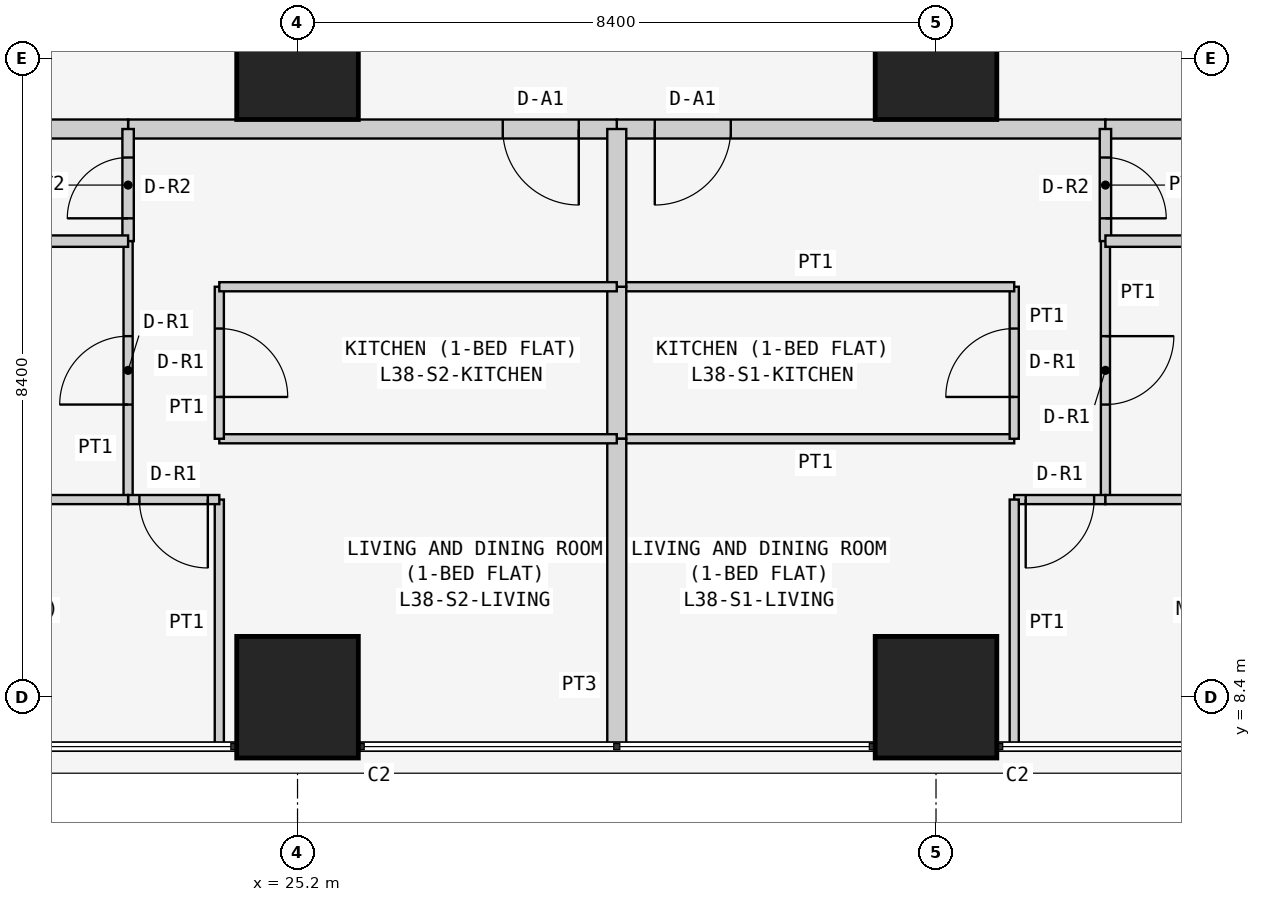
"""IFC4 building model, lengths in metres.
Left out: names, types, materials, properties, quantities, classifications, styles, units other than length and angle.
Written with IfcOpenShell. Run it as: python <this file> out.ifc"""

import sys

from ifc_helpers import new_model, si_unit, direction, frame, frame_2d, origin, origin_2d, place, context, subcontext, project, spatial, rectangle, extrude, element, fill, save


model = new_model("IFC4")
c1 = context("Model", 3, precision=1e-05, world=origin(), true_north=direction((0.0, 1.0)))
c2 = subcontext(c1, "Body", "Model", "MODEL_VIEW")
j1 = project(units=[si_unit("LENGTHUNIT", "METRE"), si_unit("PLANEANGLEUNIT", "RADIAN")], contexts=[c1])
p1 = place(None, origin())
s1 = spatial("IfcSite", under=j1, at=p1, CompositionType="ELEMENT")
p2 = place(p1, origin())
s2 = spatial("IfcBuilding", under=s1, at=p2, CompositionType="ELEMENT")
p3 = place(p2, frame((0.0, 0.0, 148.5)))
s3 = spatial("IfcBuildingStorey", under=s2, at=p3, CompositionType="ELEMENT", Elevation=148.5)
for number, where, z_axis, x_axis in (
    (1, (25.2, 8.4, 0.0), (0.0, 0.0, 1.0), (1.0, 0.0, 0.0)),
    (2, (25.2, 16.8, 0.0), (0.0, 0.0, 1.0), (1.0, 0.0, 0.0)),
    (3, (33.6, 8.4, 0.0), (0.0, 0.0, 1.0), (1.0, 0.0, 0.0)),
    (4, (33.6, 16.8, 0.0), (0.0, 0.0, 1.0), (1.0, 0.0, 0.0)),
):
    element("IfcColumn", number, at=place(p3, frame(where, z_axis=z_axis, x_axis=x_axis)), inside=s3, PredefinedType="COLUMN", context=c2, shape_type="SweptSolid", body=[
        extrude(rectangle(XDim=1.6, YDim=1.6, at=origin_2d()), origin(), (0.0, 0.0, 1.0), 3.6),
    ])
p4 = place(p3, frame((35.829, 15.875, 0.0), z_axis=(0.0, 0.0, 1.0), x_axis=(-1.0, 0.0, 0.0)))
e5 = element("IfcWall", 5, at=p4, inside=s3, PredefinedType="PARTITIONING", context=c2, shape_type="SweptSolid", body=[
    extrude(rectangle(XDim=6.429, YDim=0.25, at=frame_2d((3.215, 0.0))), origin(), (0.0, 0.0, 1.0), 3.45),
])
p5 = place(p4, frame((4.929, 0.0, 0.0)))
e6 = element("IfcOpeningElement", 6, at=p5, cuts=e5, PredefinedType="OPENING", context=c2, shape_type="SweptSolid", body=[
    extrude(rectangle(XDim=1.0, YDim=2.1, at=frame_2d((0.5, 1.05))), frame((0.0, 0.135, 0.0), z_axis=(0.0, -1.0, 0.0), x_axis=(1.0, 0.0, 0.0)), (0.0, 0.0, 1.0), 0.27),
])
p6 = place(p3, frame((42.7, 15.875, 0.0), z_axis=(0.0, 0.0, 1.0), x_axis=(-1.0, 0.0, 0.0)))
e7 = element("IfcWall", 7, at=p6, inside=s3, PredefinedType="PARTITIONING", context=c2, shape_type="SweptSolid", body=[
    extrude(rectangle(XDim=6.871, YDim=0.25, at=frame_2d((3.436, 0.0))), origin(), (0.0, 0.0, 1.0), 3.45),
])
p7 = place(p3, frame((29.4, 15.875, 0.0), z_axis=(0.0, 0.0, 1.0), x_axis=(-1.0, 0.0, 0.0)))
e8 = element("IfcWall", 8, at=p7, inside=s3, PredefinedType="PARTITIONING", context=c2, shape_type="SweptSolid", body=[
    extrude(rectangle(XDim=6.429, YDim=0.25, at=frame_2d((3.214, 0.0))), origin(), (0.0, 0.0, 1.0), 3.45),
])
p8 = place(p7, frame((0.5, 0.0, 0.0)))
e9 = element("IfcOpeningElement", 9, at=p8, cuts=e8, PredefinedType="OPENING", context=c2, shape_type="SweptSolid", body=[
    extrude(rectangle(XDim=1.0, YDim=2.1, at=frame_2d((0.5, 1.05))), frame((0.0, 0.135, 0.0), z_axis=(0.0, -1.0, 0.0), x_axis=(1.0, 0.0, 0.0)), (0.0, 0.0, 1.0), 0.27),
])
p9 = place(p3, frame((22.971, 15.875, 0.0), z_axis=(0.0, 0.0, 1.0), x_axis=(-1.0, 0.0, 0.0)))
e10 = element("IfcWall", 10, at=p9, inside=s3, PredefinedType="PARTITIONING", context=c2, shape_type="SweptSolid", body=[
    extrude(rectangle(XDim=6.871, YDim=0.25, at=frame_2d((3.436, 0.0))), origin(), (0.0, 0.0, 1.0), 3.45),
])
p10 = place(p3, frame((29.4, 11.8, 0.0), z_axis=(0.0, 0.0, 1.0), x_axis=(1.0, 0.0, 0.0)))
e11 = element("IfcWall", 11, at=p10, inside=s3, PredefinedType="PARTITIONING", context=c2, shape_type="SweptSolid", body=[
    extrude(rectangle(XDim=5.229, YDim=0.12, at=frame_2d((2.615, 0.0))), origin(), (0.0, 0.0, 1.0), 3.45),
])
p11 = place(p3, frame((34.629, 11.8, 0.0), z_axis=(0.0, 0.0, 1.0), x_axis=(0.0, 1.0, 0.0)))
e12 = element("IfcWall", 12, at=p11, inside=s3, PredefinedType="PARTITIONING", context=c2, shape_type="SweptSolid", body=[
    extrude(rectangle(XDim=2.0, YDim=0.12, at=frame_2d((1.0, 0.0))), origin(), (0.0, 0.0, 1.0), 3.45),
])
p12 = place(p11, frame((0.55, 0.0, 0.0)))
e13 = element("IfcOpeningElement", 13, at=p12, cuts=e12, PredefinedType="OPENING", context=c2, shape_type="SweptSolid", body=[
    extrude(rectangle(XDim=0.9, YDim=2.1, at=frame_2d((0.45, 1.05))), frame((0.0, 0.07, 0.0), z_axis=(0.0, -1.0, 0.0), x_axis=(1.0, 0.0, 0.0)), (0.0, 0.0, 1.0), 0.14),
])
p13 = place(p3, frame((34.629, 13.8, 0.0), z_axis=(0.0, 0.0, 1.0), x_axis=(-1.0, 0.0, 0.0)))
e14 = element("IfcWall", 14, at=p13, inside=s3, PredefinedType="PARTITIONING", context=c2, shape_type="SweptSolid", body=[
    extrude(rectangle(XDim=5.229, YDim=0.12, at=frame_2d((2.615, 0.0))), origin(), (0.0, 0.0, 1.0), 3.45),
])
p14 = place(p3, frame((29.4, 13.8, 0.0), z_axis=(0.0, 0.0, 1.0), x_axis=(0.0, -1.0, 0.0)))
e15 = element("IfcWall", 15, at=p14, inside=s3, PredefinedType="PARTITIONING", context=c2, shape_type="SweptSolid", body=[
    extrude(rectangle(XDim=2.0, YDim=0.25, at=frame_2d((1.0, 0.0))), origin(), (0.0, 0.0, 1.0), 2.848),
])
p15 = place(p3, frame((35.829, 15.875, 0.0), z_axis=(0.0, 0.0, 1.0), x_axis=(0.0, -1.0, 0.0)))
e16 = element("IfcWall", 16, at=p15, inside=s3, PredefinedType="PARTITIONING", context=c2, shape_type="SweptSolid", body=[
    extrude(rectangle(XDim=1.475, YDim=0.15, at=frame_2d((0.738, 0.0))), origin(), (0.0, 0.0, 1.0), 3.45),
])
p16 = place(p15, frame((0.375, 0.0, 0.0)))
e17 = element("IfcOpeningElement", 17, at=p16, cuts=e16, PredefinedType="OPENING", context=c2, shape_type="SweptSolid", body=[
    extrude(rectangle(XDim=0.8, YDim=2.1, at=frame_2d((0.4, 1.05))), frame((0.0, 0.085, 0.0), z_axis=(0.0, -1.0, 0.0), x_axis=(1.0, 0.0, 0.0)), (0.0, 0.0, 1.0), 0.17),
])
p17 = place(p3, frame((35.829, 14.4, 0.0), z_axis=(0.0, 0.0, 1.0), x_axis=(0.0, -1.0, 0.0)))
e18 = element("IfcWall", 18, at=p17, inside=s3, PredefinedType="PARTITIONING", context=c2, shape_type="SweptSolid", body=[
    extrude(rectangle(XDim=3.4, YDim=0.12, at=frame_2d((1.7, 0.0))), origin(), (0.0, 0.0, 1.0), 3.45),
])
p18 = place(p17, frame((1.25, 0.0, 0.0)))
e19 = element("IfcOpeningElement", 19, at=p18, cuts=e18, PredefinedType="OPENING", context=c2, shape_type="SweptSolid", body=[
    extrude(rectangle(XDim=0.9, YDim=2.1, at=frame_2d((0.45, 1.05))), frame((0.0, 0.07, 0.0), z_axis=(0.0, -1.0, 0.0), x_axis=(1.0, 0.0, 0.0)), (0.0, 0.0, 1.0), 0.14),
])
p19 = place(p3, frame((35.829, 11.0, 0.0), z_axis=(0.0, 0.0, 1.0), x_axis=(-1.0, 0.0, 0.0)))
e20 = element("IfcWall", 20, at=p19, inside=s3, PredefinedType="PARTITIONING", context=c2, shape_type="SweptSolid", body=[
    extrude(rectangle(XDim=1.2, YDim=0.12, at=frame_2d((0.6, 0.0))), origin(), (0.0, 0.0, 1.0), 3.45),
])
p20 = place(p19, frame((0.149, 0.0, 0.0)))
e21 = element("IfcOpeningElement", 21, at=p20, cuts=e20, PredefinedType="OPENING", context=c2, shape_type="SweptSolid", body=[
    extrude(rectangle(XDim=0.9, YDim=2.1, at=frame_2d((0.45, 1.05))), frame((0.0, 0.07, 0.0), z_axis=(0.0, -1.0, 0.0), x_axis=(1.0, 0.0, 0.0)), (0.0, 0.0, 1.0), 0.14),
])
p21 = place(p3, frame((34.629, 11.0, 0.0), z_axis=(0.0, 0.0, 1.0), x_axis=(0.0, -1.0, 0.0)))
e22 = element("IfcWall", 22, at=p21, inside=s3, PredefinedType="PARTITIONING", context=c2, shape_type="SweptSolid", body=[
    extrude(rectangle(XDim=3.25, YDim=0.12, at=frame_2d((1.625, 0.0))), origin(), (0.0, 0.0, 1.0), 3.45),
])
p22 = place(p3, frame((29.4, 7.75, 0.0), z_axis=(0.0, 0.0, 1.0), x_axis=(0.0, 1.0, 0.0)))
e23 = element("IfcWall", 23, at=p22, inside=s3, PredefinedType="PARTITIONING", context=c2, shape_type="SweptSolid", body=[
    extrude(rectangle(XDim=4.05, YDim=0.25, at=frame_2d((2.025, 0.0))), origin(), (0.0, 0.0, 1.0), 2.848),
])
p23 = place(p3, frame((29.4, 13.8, 0.0), z_axis=(0.0, 0.0, 1.0), x_axis=(0.0, 1.0, 0.0)))
e24 = element("IfcWall", 24, at=p23, inside=s3, PredefinedType="PARTITIONING", context=c2, shape_type="SweptSolid", body=[
    extrude(rectangle(XDim=2.075, YDim=0.25, at=frame_2d((1.038, 0.0))), origin(), (0.0, 0.0, 1.0), 2.848),
])
p24 = place(p3, frame((35.829, 14.4, 0.0), z_axis=(0.0, 0.0, 1.0), x_axis=(1.0, 0.0, 0.0)))
e25 = element("IfcWall", 25, at=p24, inside=s3, PredefinedType="PARTITIONING", context=c2, shape_type="SweptSolid", body=[
    extrude(rectangle(XDim=6.871, YDim=0.15, at=frame_2d((3.436, 0.0))), origin(), (0.0, 0.0, 1.0), 3.45),
])
p25 = place(p3, frame((35.829, 11.0, 0.0), z_axis=(0.0, 0.0, 1.0), x_axis=(1.0, 0.0, 0.0)))
e26 = element("IfcWall", 26, at=p25, inside=s3, PredefinedType="PARTITIONING", context=c2, shape_type="SweptSolid", body=[
    extrude(rectangle(XDim=6.871, YDim=0.12, at=frame_2d((3.436, 0.0))), origin(), (0.0, 0.0, 1.0), 3.45),
])
p26 = place(p3, frame((29.4, 11.8, 0.0), z_axis=(0.0, 0.0, 1.0), x_axis=(-1.0, 0.0, 0.0)))
e27 = element("IfcWall", 27, at=p26, inside=s3, PredefinedType="PARTITIONING", context=c2, shape_type="SweptSolid", body=[
    extrude(rectangle(XDim=5.229, YDim=0.12, at=frame_2d((2.615, 0.0))), origin(), (0.0, 0.0, 1.0), 3.45),
])
p27 = place(p3, frame((24.171, 11.8, 0.0), z_axis=(0.0, 0.0, 1.0), x_axis=(0.0, 1.0, 0.0)))
e28 = element("IfcWall", 28, at=p27, inside=s3, PredefinedType="PARTITIONING", context=c2, shape_type="SweptSolid", body=[
    extrude(rectangle(XDim=2.0, YDim=0.12, at=frame_2d((1.0, 0.0))), origin(), (0.0, 0.0, 1.0), 3.45),
])
p28 = place(p27, frame((0.55, 0.0, 0.0)))
e29 = element("IfcOpeningElement", 29, at=p28, cuts=e28, PredefinedType="OPENING", context=c2, shape_type="SweptSolid", body=[
    extrude(rectangle(XDim=0.9, YDim=2.1, at=frame_2d((0.45, 1.05))), frame((0.0, 0.07, 0.0), z_axis=(0.0, -1.0, 0.0), x_axis=(1.0, 0.0, 0.0)), (0.0, 0.0, 1.0), 0.14),
])
p29 = place(p3, frame((24.171, 13.8, 0.0), z_axis=(0.0, 0.0, 1.0), x_axis=(1.0, 0.0, 0.0)))
e30 = element("IfcWall", 30, at=p29, inside=s3, PredefinedType="PARTITIONING", context=c2, shape_type="SweptSolid", body=[
    extrude(rectangle(XDim=5.229, YDim=0.12, at=frame_2d((2.615, 0.0))), origin(), (0.0, 0.0, 1.0), 3.45),
])
p30 = place(p3, frame((22.971, 14.4, 0.0), z_axis=(0.0, 0.0, 1.0), x_axis=(0.0, 1.0, 0.0)))
e31 = element("IfcWall", 31, at=p30, inside=s3, PredefinedType="PARTITIONING", context=c2, shape_type="SweptSolid", body=[
    extrude(rectangle(XDim=1.475, YDim=0.15, at=frame_2d((0.738, 0.0))), origin(), (0.0, 0.0, 1.0), 3.45),
])
p31 = place(p30, frame((0.3, 0.0, 0.0)))
e32 = element("IfcOpeningElement", 32, at=p31, cuts=e31, PredefinedType="OPENING", context=c2, shape_type="SweptSolid", body=[
    extrude(rectangle(XDim=0.8, YDim=2.1, at=frame_2d((0.4, 1.05))), frame((0.0, 0.085, 0.0), z_axis=(0.0, -1.0, 0.0), x_axis=(1.0, 0.0, 0.0)), (0.0, 0.0, 1.0), 0.17),
])
p32 = place(p3, frame((22.971, 11.0, 0.0), z_axis=(0.0, 0.0, 1.0), x_axis=(0.0, 1.0, 0.0)))
e33 = element("IfcWall", 33, at=p32, inside=s3, PredefinedType="PARTITIONING", context=c2, shape_type="SweptSolid", body=[
    extrude(rectangle(XDim=3.4, YDim=0.12, at=frame_2d((1.7, 0.0))), origin(), (0.0, 0.0, 1.0), 3.45),
])
p33 = place(p32, frame((1.25, 0.0, 0.0)))
e34 = element("IfcOpeningElement", 34, at=p33, cuts=e33, PredefinedType="OPENING", context=c2, shape_type="SweptSolid", body=[
    extrude(rectangle(XDim=0.9, YDim=2.1, at=frame_2d((0.45, 1.05))), frame((0.0, 0.07, 0.0), z_axis=(0.0, -1.0, 0.0), x_axis=(1.0, 0.0, 0.0)), (0.0, 0.0, 1.0), 0.14),
])
p34 = place(p3, frame((24.171, 7.75, 0.0), z_axis=(0.0, 0.0, 1.0), x_axis=(0.0, 1.0, 0.0)))
e35 = element("IfcWall", 35, at=p34, inside=s3, PredefinedType="PARTITIONING", context=c2, shape_type="SweptSolid", body=[
    extrude(rectangle(XDim=3.25, YDim=0.12, at=frame_2d((1.625, 0.0))), origin(), (0.0, 0.0, 1.0), 3.45),
])
p35 = place(p3, frame((24.171, 11.0, 0.0), z_axis=(0.0, 0.0, 1.0), x_axis=(-1.0, 0.0, 0.0)))
e36 = element("IfcWall", 36, at=p35, inside=s3, PredefinedType="PARTITIONING", context=c2, shape_type="SweptSolid", body=[
    extrude(rectangle(XDim=1.2, YDim=0.12, at=frame_2d((0.6, 0.0))), origin(), (0.0, 0.0, 1.0), 3.45),
])
p36 = place(p35, frame((0.151, 0.0, 0.0)))
e37 = element("IfcOpeningElement", 37, at=p36, cuts=e36, PredefinedType="OPENING", context=c2, shape_type="SweptSolid", body=[
    extrude(rectangle(XDim=0.9, YDim=2.1, at=frame_2d((0.45, 1.05))), frame((0.0, 0.07, 0.0), z_axis=(0.0, -1.0, 0.0), x_axis=(1.0, 0.0, 0.0)), (0.0, 0.0, 1.0), 0.14),
])
p37 = place(p3, frame((22.971, 14.4, 0.0), z_axis=(0.0, 0.0, 1.0), x_axis=(-1.0, 0.0, 0.0)))
e38 = element("IfcWall", 38, at=p37, inside=s3, PredefinedType="PARTITIONING", context=c2, shape_type="SweptSolid", body=[
    extrude(rectangle(XDim=6.871, YDim=0.15, at=frame_2d((3.436, 0.0))), origin(), (0.0, 0.0, 1.0), 3.45),
])
p38 = place(p3, frame((22.971, 11.0, 0.0), z_axis=(0.0, 0.0, 1.0), x_axis=(-1.0, 0.0, 0.0)))
e39 = element("IfcWall", 39, at=p38, inside=s3, PredefinedType="PARTITIONING", context=c2, shape_type="SweptSolid", body=[
    extrude(rectangle(XDim=6.871, YDim=0.12, at=frame_2d((3.436, 0.0))), origin(), (0.0, 0.0, 1.0), 3.45),
])
p39 = place(p5, origin())
e40 = element("IfcDoor", 40, at=p39, inside=s3, OperationType="SINGLE_SWING_RIGHT", PredefinedType="DOOR", context=c2, shape_type="SweptSolid", body=[
    extrude(rectangle(XDim=1.0, YDim=2.1, at=frame_2d((0.5, 1.05))), frame((0.0, 0.025, 0.0), z_axis=(0.0, -1.0, 0.0), x_axis=(1.0, 0.0, 0.0)), (0.0, 0.0, 1.0), 0.05),
])
fill(e6, e40)
p40 = place(p12, origin())
e41 = element("IfcDoor", 41, at=p40, inside=s3, OperationType="SINGLE_SWING_LEFT", PredefinedType="DOOR", context=c2, shape_type="SweptSolid", body=[
    extrude(rectangle(XDim=0.9, YDim=2.1, at=frame_2d((0.45, 1.05))), frame((0.0, 0.025, 0.0), z_axis=(0.0, -1.0, 0.0), x_axis=(1.0, 0.0, 0.0)), (0.0, 0.0, 1.0), 0.05),
])
fill(e13, e41)
p41 = place(p16, origin())
e42 = element("IfcDoor", 42, at=p41, inside=s3, OperationType="SINGLE_SWING_RIGHT", PredefinedType="DOOR", context=c2, shape_type="SweptSolid", body=[
    extrude(rectangle(XDim=0.8, YDim=2.1, at=frame_2d((0.4, 1.05))), frame((0.0, 0.025, 0.0), z_axis=(0.0, -1.0, 0.0), x_axis=(1.0, 0.0, 0.0)), (0.0, 0.0, 1.0), 0.05),
])
fill(e17, e42)
p42 = place(p18, origin())
e43 = element("IfcDoor", 43, at=p42, inside=s3, OperationType="SINGLE_SWING_LEFT", PredefinedType="DOOR", context=c2, shape_type="SweptSolid", body=[
    extrude(rectangle(XDim=0.9, YDim=2.1, at=frame_2d((0.45, 1.05))), frame((0.0, 0.025, 0.0), z_axis=(0.0, -1.0, 0.0), x_axis=(1.0, 0.0, 0.0)), (0.0, 0.0, 1.0), 0.05),
])
fill(e19, e43)
p43 = place(p20, origin())
e44 = element("IfcDoor", 44, at=p43, inside=s3, OperationType="SINGLE_SWING_RIGHT", PredefinedType="DOOR", context=c2, shape_type="SweptSolid", body=[
    extrude(rectangle(XDim=0.9, YDim=2.1, at=frame_2d((0.45, 1.05))), frame((0.0, 0.025, 0.0), z_axis=(0.0, -1.0, 0.0), x_axis=(1.0, 0.0, 0.0)), (0.0, 0.0, 1.0), 0.05),
])
fill(e21, e44)
p44 = place(p8, origin())
e45 = element("IfcDoor", 45, at=p44, inside=s3, OperationType="SINGLE_SWING_LEFT", PredefinedType="DOOR", context=c2, shape_type="SweptSolid", body=[
    extrude(rectangle(XDim=1.0, YDim=2.1, at=frame_2d((0.5, 1.05))), frame((0.0, 0.025, 0.0), z_axis=(0.0, -1.0, 0.0), x_axis=(1.0, 0.0, 0.0)), (0.0, 0.0, 1.0), 0.05),
])
fill(e9, e45)
p45 = place(p28, frame((0.9, 0.0, 0.0), z_axis=(0.0, 0.0, 1.0), x_axis=(-1.0, 0.0, 0.0)))
e46 = element("IfcDoor", 46, at=p45, inside=s3, OperationType="SINGLE_SWING_RIGHT", PredefinedType="DOOR", context=c2, shape_type="SweptSolid", body=[
    extrude(rectangle(XDim=0.9, YDim=2.1, at=frame_2d((0.45, 1.05))), frame((0.0, 0.025, 0.0), z_axis=(0.0, -1.0, 0.0), x_axis=(1.0, 0.0, 0.0)), (0.0, 0.0, 1.0), 0.05),
])
fill(e29, e46)
p46 = place(p31, origin())
e47 = element("IfcDoor", 47, at=p46, inside=s3, OperationType="SINGLE_SWING_LEFT", PredefinedType="DOOR", context=c2, shape_type="SweptSolid", body=[
    extrude(rectangle(XDim=0.8, YDim=2.1, at=frame_2d((0.4, 1.05))), frame((0.0, 0.025, 0.0), z_axis=(0.0, -1.0, 0.0), x_axis=(1.0, 0.0, 0.0)), (0.0, 0.0, 1.0), 0.05),
])
fill(e32, e47)
p47 = place(p33, origin())
e48 = element("IfcDoor", 48, at=p47, inside=s3, OperationType="SINGLE_SWING_LEFT", PredefinedType="DOOR", context=c2, shape_type="SweptSolid", body=[
    extrude(rectangle(XDim=0.9, YDim=2.1, at=frame_2d((0.45, 1.05))), frame((0.0, 0.025, 0.0), z_axis=(0.0, -1.0, 0.0), x_axis=(1.0, 0.0, 0.0)), (0.0, 0.0, 1.0), 0.05),
])
fill(e34, e48)
p48 = place(p36, origin())
e49 = element("IfcDoor", 49, at=p48, inside=s3, OperationType="SINGLE_SWING_LEFT", PredefinedType="DOOR", context=c2, shape_type="SweptSolid", body=[
    extrude(rectangle(XDim=0.9, YDim=2.1, at=frame_2d((0.45, 1.05))), frame((0.0, 0.025, 0.0), z_axis=(0.0, -1.0, 0.0), x_axis=(1.0, 0.0, 0.0)), (0.0, 0.0, 1.0), 0.05),
])
fill(e37, e49)
save(model, sys.argv[1])
